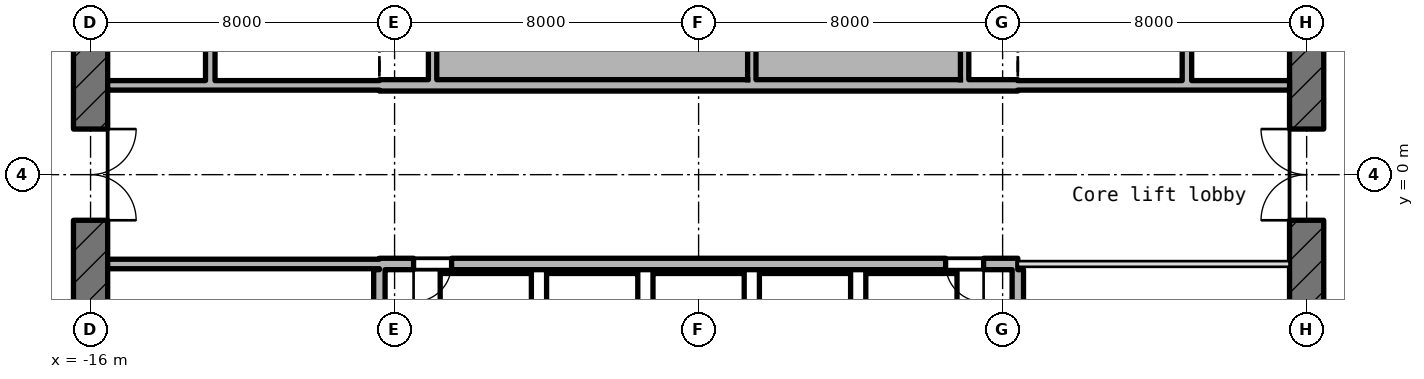
"""IFC4 building model, lengths in metres.
Left out: names, types, materials, properties, quantities, classifications, styles, units other than length and angle.
Written with IfcOpenShell. Run it as: python <this file> out.ifc"""

import sys

from ifc_helpers import new_model, si_unit, direction, frame, frame_2d, origin, place, context, subcontext, project, spatial, rectangle, extrude, element, fill, save


model = new_model("IFC4")
c1 = context("Model", 3, precision=1e-05, world=origin(), true_north=direction((0.0, 1.0)))
c2 = subcontext(c1, "Body", "Model", "MODEL_VIEW")
j1 = project(units=[si_unit("LENGTHUNIT", "METRE"), si_unit("PLANEANGLEUNIT", "RADIAN")], contexts=[c1])
p1 = place(None, origin())
s1 = spatial("IfcSite", under=j1, at=p1, CompositionType="ELEMENT")
p2 = place(p1, origin())
s2 = spatial("IfcBuilding", under=s1, at=p2, CompositionType="ELEMENT")
p3 = place(p2, frame((0.0, 0.0, 273.1)))
s3 = spatial("IfcBuildingStorey", under=s2, at=p3, CompositionType="ELEMENT", Elevation=273.1)
p4 = place(p3, frame((16.0, -10.186, -0.3), z_axis=(0.0, 0.0, 1.0), x_axis=(0.0, 1.0, 0.0)))
e1 = element("IfcWall", 1, at=p4, inside=s3, PredefinedType="SHEAR", context=c2, shape_type="SweptSolid", body=[
    extrude(rectangle(XDim=20.373, YDim=0.9, at=frame_2d((10.186, 0.0))), origin(), (0.0, 0.0, 1.0), 6.05),
])
p5 = place(p4, frame((8.986, 0.0, 0.3)))
e2 = element("IfcOpeningElement", 2, at=p5, cuts=e1, PredefinedType="OPENING", context=c2, shape_type="SweptSolid", body=[
    extrude(rectangle(XDim=2.4, YDim=2.1, at=frame_2d((1.2, 1.05))), frame((0.0, 0.46, 0.0), z_axis=(0.0, -1.0, 0.0), x_axis=(1.0, 0.0, 0.0)), (0.0, 0.0, 1.0), 0.92),
])
p6 = place(p4, frame((13.586, 0.0, 0.3)))
e3 = element("IfcOpeningElement", 3, at=p6, cuts=e1, PredefinedType="OPENING", context=c2, shape_type="SweptSolid", body=[
    extrude(rectangle(XDim=1.2, YDim=2.1, at=frame_2d((0.6, 1.05))), frame((0.0, 0.46, 0.0), z_axis=(0.0, -1.0, 0.0), x_axis=(1.0, 0.0, 0.0)), (0.0, 0.0, 1.0), 0.92),
])
p7 = place(p4, frame((2.4, 0.0, 0.3)))
e4 = element("IfcOpeningElement", 4, at=p7, cuts=e1, PredefinedType="OPENING", context=c2, shape_type="SweptSolid", body=[
    extrude(rectangle(XDim=1.2, YDim=2.1, at=frame_2d((0.6, 1.05))), frame((0.0, 0.46, 0.0), z_axis=(0.0, -1.0, 0.0), x_axis=(1.0, 0.0, 0.0)), (0.0, 0.0, 1.0), 0.92),
])
p8 = place(p3, frame((-16.0, 10.186, -0.3), z_axis=(0.0, 0.0, 1.0), x_axis=(0.0, -1.0, 0.0)))
e5 = element("IfcWall", 5, at=p8, inside=s3, PredefinedType="SHEAR", context=c2, shape_type="SweptSolid", body=[
    extrude(rectangle(XDim=20.373, YDim=0.9, at=frame_2d((10.186, 0.0))), origin(), (0.0, 0.0, 1.0), 6.05),
])
p9 = place(p8, frame((8.986, 0.0, 0.3)))
e6 = element("IfcOpeningElement", 6, at=p9, cuts=e5, PredefinedType="OPENING", context=c2, shape_type="SweptSolid", body=[
    extrude(rectangle(XDim=2.4, YDim=2.1, at=frame_2d((1.2, 1.05))), frame((0.0, 0.46, 0.0), z_axis=(0.0, -1.0, 0.0), x_axis=(1.0, 0.0, 0.0)), (0.0, 0.0, 1.0), 0.92),
])
p10 = place(p8, frame((5.586, 0.0, 0.3)))
e7 = element("IfcOpeningElement", 7, at=p10, cuts=e5, PredefinedType="OPENING", context=c2, shape_type="SweptSolid", body=[
    extrude(rectangle(XDim=1.2, YDim=2.1, at=frame_2d((0.6, 1.05))), frame((0.0, 0.46, 0.0), z_axis=(0.0, -1.0, 0.0), x_axis=(1.0, 0.0, 0.0)), (0.0, 0.0, 1.0), 0.92),
])
p11 = place(p3, frame((-15.55, -2.35, 0.0), z_axis=(0.0, 0.0, 1.0), x_axis=(1.0, 0.0, 0.0)))
e8 = element("IfcWall", 8, at=p11, inside=s3, PredefinedType="STANDARD", context=c2, shape_type="SweptSolid", body=[
    extrude(rectangle(XDim=7.15, YDim=0.25, at=frame_2d((3.575, 0.0))), origin(), (0.0, 0.0, 1.0), 5.75),
])
p12 = place(p3, frame((-8.4, -2.35, -0.3), z_axis=(0.0, 0.0, 1.0), x_axis=(1.0, 0.0, 0.0)))
e9 = element("IfcWall", 9, at=p12, inside=s3, PredefinedType="SHEAR", context=c2, shape_type="SweptSolid", body=[
    extrude(rectangle(XDim=16.8, YDim=0.3, at=frame_2d((8.4, 0.0))), origin(), (0.0, 0.0, 1.0), 6.05),
])
p13 = place(p12, frame((0.9, 0.0, 0.3)))
e10 = element("IfcOpeningElement", 10, at=p13, cuts=e9, PredefinedType="OPENING", context=c2, shape_type="SweptSolid", body=[
    extrude(rectangle(XDim=1.0, YDim=2.1, at=frame_2d((0.5, 1.05))), frame((0.0, 0.16, 0.0), z_axis=(0.0, -1.0, 0.0), x_axis=(1.0, 0.0, 0.0)), (0.0, 0.0, 1.0), 0.32),
])
p14 = place(p12, frame((14.9, 0.0, 0.3)))
e11 = element("IfcOpeningElement", 11, at=p14, cuts=e9, PredefinedType="OPENING", context=c2, shape_type="SweptSolid", body=[
    extrude(rectangle(XDim=1.0, YDim=2.1, at=frame_2d((0.5, 1.05))), frame((0.0, 0.16, 0.0), z_axis=(0.0, -1.0, 0.0), x_axis=(1.0, 0.0, 0.0)), (0.0, 0.0, 1.0), 0.32),
])
p15 = place(p3, frame((8.4, -2.35, 0.0), z_axis=(0.0, 0.0, 1.0), x_axis=(1.0, 0.0, 0.0)))
e12 = element("IfcWall", 12, at=p15, inside=s3, PredefinedType="PARTITIONING", context=c2, shape_type="SweptSolid", body=[
    extrude(rectangle(XDim=7.15, YDim=0.15, at=frame_2d((3.575, 0.0))), origin(), (0.0, 0.0, 1.0), 5.75),
])
p16 = place(p3, frame((-15.55, 2.35, 0.0), z_axis=(0.0, 0.0, 1.0), x_axis=(1.0, 0.0, 0.0)))
e13 = element("IfcWall", 13, at=p16, inside=s3, PredefinedType="STANDARD", context=c2, shape_type="SweptSolid", body=[
    extrude(rectangle(XDim=7.15, YDim=0.25, at=frame_2d((3.575, 0.0))), origin(), (0.0, 0.0, 1.0), 5.75),
])
p17 = place(p3, frame((-8.4, 2.35, -0.3), z_axis=(0.0, 0.0, 1.0), x_axis=(1.0, 0.0, 0.0)))
e14 = element("IfcWall", 14, at=p17, inside=s3, PredefinedType="SHEAR", context=c2, shape_type="SweptSolid", body=[
    extrude(rectangle(XDim=16.8, YDim=0.3, at=frame_2d((8.4, 0.0))), origin(), (0.0, 0.0, 1.0), 6.05),
])
p18 = place(p3, frame((8.4, 2.35, 0.0), z_axis=(0.0, 0.0, 1.0), x_axis=(1.0, 0.0, 0.0)))
e15 = element("IfcWall", 15, at=p18, inside=s3, PredefinedType="STANDARD", context=c2, shape_type="SweptSolid", body=[
    extrude(rectangle(XDim=7.15, YDim=0.25, at=frame_2d((3.575, 0.0))), origin(), (0.0, 0.0, 1.0), 5.75),
])
p19 = place(p3, frame((-12.85, 2.475, 0.0), z_axis=(0.0, 0.0, 1.0), x_axis=(0.0, 1.0, 0.0)))
e16 = element("IfcWall", 16, at=p19, inside=s3, PredefinedType="STANDARD", context=c2, shape_type="SweptSolid", body=[
    extrude(rectangle(XDim=3.05, YDim=0.25, at=frame_2d((1.525, 0.0))), origin(), (0.0, 0.0, 1.0), 5.75),
])
p20 = place(p3, frame((-8.4, -8.75, -0.3), z_axis=(0.0, 0.0, 1.0), x_axis=(0.0, 1.0, 0.0)))
e17 = element("IfcWall", 17, at=p20, inside=s3, PredefinedType="SHEAR", context=c2, shape_type="SweptSolid", body=[
    extrude(rectangle(XDim=6.25, YDim=0.3, at=frame_2d((3.125, 0.0))), origin(), (0.0, 0.0, 1.0), 6.05),
])
p21 = place(p3, frame((-7.0, 2.5, 0.0), z_axis=(0.0, 0.0, 1.0), x_axis=(0.0, 1.0, 0.0)))
e18 = element("IfcWall", 18, at=p21, inside=s3, PredefinedType="STANDARD", context=c2, shape_type="SweptSolid", body=[
    extrude(rectangle(XDim=2.74, YDim=0.22, at=frame_2d((1.37, 0.0))), origin(), (0.0, 0.0, 1.0), 5.75),
])
p22 = place(p3, frame((0.0, -5.24, 0.0), z_axis=(0.0, 0.0, 1.0), x_axis=(0.0, 1.0, 0.0)))
e19 = element("IfcWall", 19, at=p22, inside=s3, PredefinedType="PARTITIONING", context=c2, shape_type="SweptSolid", body=[
    extrude(rectangle(XDim=2.74, YDim=0.15, at=frame_2d((1.37, 0.0))), origin(), (0.0, 0.0, 1.0), 5.75),
])
for number, where, z_axis, x_axis in (
    (20, (1.4, 2.5, 0.0), (0.0, 0.0, 1.0), (0.0, 1.0, 0.0)),
    (21, (7.0, 2.5, 0.0), (0.0, 0.0, 1.0), (0.0, 1.0, 0.0)),
):
    element("IfcWall", number, at=place(p3, frame(where, z_axis=z_axis, x_axis=x_axis)), inside=s3, PredefinedType="STANDARD", context=c2, shape_type="SweptSolid", body=[
        extrude(rectangle(XDim=2.74, YDim=0.22, at=frame_2d((1.37, 0.0))), origin(), (0.0, 0.0, 1.0), 5.75),
    ])
p23 = place(p3, frame((8.4, -8.35, -0.3), z_axis=(0.0, 0.0, 1.0), x_axis=(0.0, 1.0, 0.0)))
e22 = element("IfcWall", 22, at=p23, inside=s3, PredefinedType="SHEAR", context=c2, shape_type="SweptSolid", body=[
    extrude(rectangle(XDim=5.85, YDim=0.3, at=frame_2d((2.925, 0.0))), origin(), (0.0, 0.0, 1.0), 6.05),
])
p24 = place(p3, frame((12.85, 2.475, 0.0), z_axis=(0.0, 0.0, 1.0), x_axis=(0.0, 1.0, 0.0)))
e23 = element("IfcWall", 23, at=p24, inside=s3, PredefinedType="STANDARD", context=c2, shape_type="SweptSolid", body=[
    extrude(rectangle(XDim=3.05, YDim=0.25, at=frame_2d((1.525, 0.0))), origin(), (0.0, 0.0, 1.0), 5.75),
])
p25 = place(p9, origin())
e24 = element("IfcDoor", 24, at=p25, inside=s3, OperationType="DOUBLE_DOOR_SINGLE_SWING", PredefinedType="DOOR", context=c2, shape_type="SweptSolid", body=[
    extrude(rectangle(XDim=2.4, YDim=2.1, at=frame_2d((1.2, 1.05))), frame((0.0, 0.025, 0.0), z_axis=(0.0, -1.0, 0.0), x_axis=(1.0, 0.0, 0.0)), (0.0, 0.0, 1.0), 0.05),
])
fill(e6, e24)
p26 = place(p5, origin())
e25 = element("IfcDoor", 25, at=p26, inside=s3, OperationType="DOUBLE_DOOR_SINGLE_SWING", PredefinedType="DOOR", context=c2, shape_type="SweptSolid", body=[
    extrude(rectangle(XDim=2.4, YDim=2.1, at=frame_2d((1.2, 1.05))), frame((0.0, 0.025, 0.0), z_axis=(0.0, -1.0, 0.0), x_axis=(1.0, 0.0, 0.0)), (0.0, 0.0, 1.0), 0.05),
])
fill(e2, e25)
p27 = place(p13, frame((1.0, 0.0, 0.0), z_axis=(0.0, 0.0, 1.0), x_axis=(-1.0, 0.0, 0.0)))
e26 = element("IfcDoor", 26, at=p27, inside=s3, OperationType="SINGLE_SWING_LEFT", PredefinedType="DOOR", context=c2, shape_type="SweptSolid", body=[
    extrude(rectangle(XDim=1.0, YDim=2.1, at=frame_2d((0.5, 1.05))), frame((0.0, 0.025, 0.0), z_axis=(0.0, -1.0, 0.0), x_axis=(1.0, 0.0, 0.0)), (0.0, 0.0, 1.0), 0.05),
])
fill(e10, e26)
p28 = place(p14, frame((1.0, 0.0, 0.0), z_axis=(0.0, 0.0, 1.0), x_axis=(-1.0, 0.0, 0.0)))
e27 = element("IfcDoor", 27, at=p28, inside=s3, OperationType="SINGLE_SWING_LEFT", PredefinedType="DOOR", context=c2, shape_type="SweptSolid", body=[
    extrude(rectangle(XDim=1.0, YDim=2.1, at=frame_2d((0.5, 1.05))), frame((0.0, 0.025, 0.0), z_axis=(0.0, -1.0, 0.0), x_axis=(1.0, 0.0, 0.0)), (0.0, 0.0, 1.0), 0.05),
])
fill(e11, e27)
save(model, sys.argv[1])
